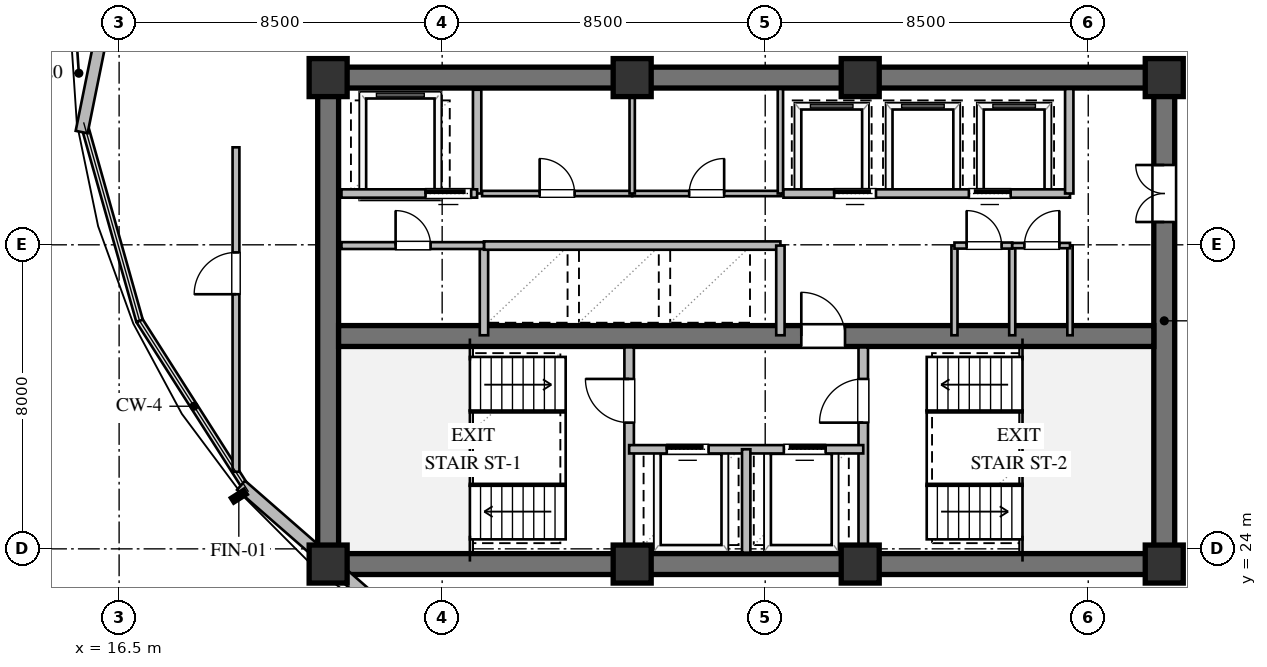
"""IFC4 building model, lengths in metres.
Left out: names, types, materials, properties, quantities, classifications, styles, units other than length and angle.
Written with IfcOpenShell. Run it as: python <this file> out.ifc"""

import sys

from ifc_helpers import new_model, si_unit, direction, frame, frame_2d, origin, origin_2d, place, context, subcontext, project, spatial, rectangle, extrude, element, fill, save


model = new_model("IFC4")
c1 = context("Model", 3, precision=1e-05, world=origin(), true_north=direction((0.0, 1.0)))
c2 = subcontext(c1, "Body", "Model", "MODEL_VIEW")
j1 = project(units=[si_unit("LENGTHUNIT", "METRE"), si_unit("PLANEANGLEUNIT", "RADIAN")], contexts=[c1])
p1 = place(None, origin())
s1 = spatial("IfcSite", under=j1, at=p1, CompositionType="ELEMENT")
p2 = place(p1, origin())
s2 = spatial("IfcBuilding", under=s1, at=p2, CompositionType="ELEMENT")
p3 = place(p2, frame((0.0, 0.0, 138.6)))
s3 = spatial("IfcBuildingStorey", under=s2, at=p3, CompositionType="ELEMENT", Elevation=138.6)
for number, where, z_axis, x_axis in (
    (1, (21.725, 23.6, 0.0), (0.0, 0.0, 1.0), (1.0, 0.0, 0.0)),
    (2, (21.725, 36.4, 0.0), (0.0, 0.0, 1.0), (1.0, 0.0, 0.0)),
):
    element("IfcWall", number, at=place(p3, frame(where, z_axis=z_axis, x_axis=x_axis)), inside=s3, PredefinedType="SHEAR", context=c2, shape_type="SweptSolid", body=[
        extrude(rectangle(XDim=22.55, YDim=0.55, at=frame_2d((11.275, 0.0))), origin(), (0.0, 0.0, 1.0), 3.36),
    ])
p4 = place(p3, frame((22.0, 23.875, 0.0), z_axis=(0.0, 0.0, 1.0), x_axis=(0.0, 1.0, 0.0)))
e3 = element("IfcWall", 3, at=p4, inside=s3, PredefinedType="SHEAR", context=c2, shape_type="SweptSolid", body=[
    extrude(rectangle(XDim=12.25, YDim=0.55, at=frame_2d((6.125, 0.0))), origin(), (0.0, 0.0, 1.0), 3.36),
])
p5 = place(p3, frame((44.0, 23.875, 0.0), z_axis=(0.0, 0.0, 1.0), x_axis=(0.0, 1.0, 0.0)))
e4 = element("IfcWall", 4, at=p5, inside=s3, PredefinedType="SHEAR", context=c2, shape_type="SweptSolid", body=[
    extrude(rectangle(XDim=12.25, YDim=0.55, at=frame_2d((6.125, 0.0))), origin(), (0.0, 0.0, 1.0), 3.36),
])
p6 = place(p5, frame((8.725, 0.0, 0.0)))
e5 = element("IfcOpeningElement", 5, at=p6, cuts=e4, PredefinedType="OPENING", context=c2, shape_type="SweptSolid", body=[
    extrude(rectangle(XDim=1.5, YDim=2.15, at=frame_2d((0.75, 1.075))), frame((0.0, 0.285, 0.0), z_axis=(0.0, -1.0, 0.0), x_axis=(1.0, 0.0, 0.0)), (0.0, 0.0, 1.0), 0.57),
])
p7 = place(p3, frame((22.275, 29.6, 0.0), z_axis=(0.0, 0.0, 1.0), x_axis=(1.0, 0.0, 0.0)))
e6 = element("IfcWall", 6, at=p7, inside=s3, PredefinedType="SHEAR", context=c2, shape_type="SweptSolid", body=[
    extrude(rectangle(XDim=21.45, YDim=0.55, at=frame_2d((10.725, 0.0))), origin(), (0.0, 0.0, 1.0), 3.36),
])
p8 = place(p7, frame((12.175, 0.0, 0.0)))
e7 = element("IfcOpeningElement", 7, at=p8, cuts=e6, PredefinedType="OPENING", context=c2, shape_type="SweptSolid", body=[
    extrude(rectangle(XDim=1.15, YDim=2.1, at=frame_2d((0.575, 1.05))), frame((0.0, 0.285, 0.0), z_axis=(0.0, -1.0, 0.0), x_axis=(1.0, 0.0, 0.0)), (0.0, 0.0, 1.0), 0.57),
])
for number, where, z_axis, x_axis in (
    (8, (22.0, 23.6, 0.0), (0.0, 0.0, 1.0), (1.0, 0.0, 0.0)),
    (9, (30.0, 23.6, 0.0), (0.0, 0.0, 1.0), (1.0, 0.0, 0.0)),
    (10, (36.0, 23.6, 0.0), (0.0, 0.0, 1.0), (1.0, 0.0, 0.0)),
    (11, (44.0, 23.6, 0.0), (0.0, 0.0, 1.0), (1.0, 0.0, 0.0)),
    (12, (44.0, 36.4, 0.0), (0.0, 0.0, 1.0), (1.0, 0.0, 0.0)),
    (13, (36.0, 36.4, 0.0), (0.0, 0.0, 1.0), (1.0, 0.0, 0.0)),
    (14, (30.0, 36.4, 0.0), (0.0, 0.0, 1.0), (1.0, 0.0, 0.0)),
    (15, (22.0, 36.4, 0.0), (0.0, 0.0, 1.0), (1.0, 0.0, 0.0)),
):
    element("IfcColumn", number, at=place(p3, frame(where, z_axis=z_axis, x_axis=x_axis)), inside=s3, PredefinedType="COLUMN", context=c2, shape_type="SweptSolid", body=[
        extrude(rectangle(XDim=1.0, YDim=1.0, at=origin_2d()), origin(), (0.0, 0.0, 1.0), 3.6),
    ])
p9 = place(p3, frame((24.225, 21.727, 0.0), z_axis=(0.0, 0.0, 1.0), x_axis=(-0.753105964003, 0.657899237713, 0.0)))
e16 = element("IfcWall", 16, at=p9, inside=s3, PredefinedType="STANDARD", context=c2, shape_type="SweptSolid", body=[
    extrude(rectangle(XDim=5.998, YDim=0.32, at=frame_2d((2.999, 0.0))), origin(), (0.0, 0.0, 1.0), 2.35),
])
p10 = place(p3, frame((15.514, 34.967, 0.0), z_axis=(0.0, 0.0, 1.0), x_axis=(0.198370893133, 0.980127026848, 0.0)))
e17 = element("IfcWall", 17, at=p10, inside=s3, PredefinedType="STANDARD", context=c2, shape_type="SweptSolid", body=[
    extrude(rectangle(XDim=14.469, YDim=0.32, at=frame_2d((7.234, 0.0))), origin(), (0.0, 0.0, 1.0), 3.36),
])
p11 = place(p3, frame((29.92, 23.9, 0.0), z_axis=(0.0, 0.0, 1.0), x_axis=(0.0, 1.0, 0.0)))
e18 = element("IfcWall", 18, at=p11, inside=s3, PredefinedType="SOLIDWALL", context=c2, shape_type="SweptSolid", body=[
    extrude(rectangle(XDim=5.4, YDim=0.25, at=frame_2d((2.7, 0.0))), origin(), (0.0, 0.0, 1.0), 2.806),
])
p12 = place(p11, frame((3.421, 0.0, 0.0)))
e19 = element("IfcOpeningElement", 19, at=p12, cuts=e18, PredefinedType="OPENING", context=c2, shape_type="SweptSolid", body=[
    extrude(rectangle(XDim=1.15, YDim=2.1, at=frame_2d((0.575, 1.05))), frame((0.0, 0.135, 0.0), z_axis=(0.0, -1.0, 0.0), x_axis=(1.0, 0.0, 0.0)), (0.0, 0.0, 1.0), 0.27),
])
p13 = place(p3, frame((36.08, 23.9, 0.0), z_axis=(0.0, 0.0, 1.0), x_axis=(0.0, 1.0, 0.0)))
e20 = element("IfcWall", 20, at=p13, inside=s3, PredefinedType="SOLIDWALL", context=c2, shape_type="SweptSolid", body=[
    extrude(rectangle(XDim=5.4, YDim=0.25, at=frame_2d((2.7, 0.0))), origin(), (0.0, 0.0, 1.0), 3.36),
])
p14 = place(p13, frame((3.421, 0.0, 0.0)))
e21 = element("IfcOpeningElement", 21, at=p14, cuts=e20, PredefinedType="OPENING", context=c2, shape_type="SweptSolid", body=[
    extrude(rectangle(XDim=1.15, YDim=2.1, at=frame_2d((0.575, 1.05))), frame((0.0, 0.135, 0.0), z_axis=(0.0, -1.0, 0.0), x_axis=(1.0, 0.0, 0.0)), (0.0, 0.0, 1.0), 0.27),
])
p15 = place(p3, frame((29.92, 26.62, 0.0), z_axis=(0.0, 0.0, 1.0), x_axis=(1.0, 0.0, 0.0)))
e22 = element("IfcWall", 22, at=p15, inside=s3, PredefinedType="SOLIDWALL", context=c2, shape_type="SweptSolid", body=[
    extrude(rectangle(XDim=6.16, YDim=0.22, at=frame_2d((3.08, 0.0))), origin(), (0.0, 0.0, 1.0), 3.36),
])
p16 = place(p15, frame((0.99, 0.0, 0.0)))
e23 = element("IfcOpeningElement", 23, at=p16, cuts=e22, PredefinedType="OPENING", context=c2, shape_type="SweptSolid", body=[
    extrude(rectangle(XDim=1.1, YDim=2.1, at=frame_2d((0.55, 1.05))), frame((0.0, 0.12, 0.0), z_axis=(0.0, -1.0, 0.0), x_axis=(1.0, 0.0, 0.0)), (0.0, 0.0, 1.0), 0.24),
])
p17 = place(p15, frame((4.07, 0.0, 0.0)))
e24 = element("IfcOpeningElement", 24, at=p17, cuts=e22, PredefinedType="OPENING", context=c2, shape_type="SweptSolid", body=[
    extrude(rectangle(XDim=1.1, YDim=2.1, at=frame_2d((0.55, 1.05))), frame((0.0, 0.12, 0.0), z_axis=(0.0, -1.0, 0.0), x_axis=(1.0, 0.0, 0.0)), (0.0, 0.0, 1.0), 0.24),
])
p18 = place(p3, frame((33.0, 23.9, 0.0), z_axis=(0.0, 0.0, 1.0), x_axis=(0.0, 1.0, 0.0)))
e25 = element("IfcWall", 25, at=p18, inside=s3, PredefinedType="SOLIDWALL", context=c2, shape_type="SweptSolid", body=[
    extrude(rectangle(XDim=2.72, YDim=0.22, at=frame_2d((1.36, 0.0))), origin(), (0.0, 0.0, 1.0), 3.36),
])
p19 = place(p3, frame((25.92, 33.35, 0.0), z_axis=(0.0, 0.0, 1.0), x_axis=(0.0, 1.0, 0.0)))
e26 = element("IfcWall", 26, at=p19, inside=s3, PredefinedType="SOLIDWALL", context=c2, shape_type="SweptSolid", body=[
    extrude(rectangle(XDim=2.73, YDim=0.22, at=frame_2d((1.365, 0.0))), origin(), (0.0, 0.0, 1.0), 3.36),
])
p20 = place(p3, frame((22.35, 33.35, 0.0), z_axis=(0.0, 0.0, 1.0), x_axis=(1.0, 0.0, 0.0)))
e27 = element("IfcWall", 27, at=p20, inside=s3, PredefinedType="SOLIDWALL", context=c2, shape_type="SweptSolid", body=[
    extrude(rectangle(XDim=3.57, YDim=0.22, at=frame_2d((1.785, 0.0))), origin(), (0.0, 0.0, 1.0), 3.36),
])
p21 = place(p20, frame((2.213, 0.0, 0.0)))
e28 = element("IfcOpeningElement", 28, at=p21, cuts=e27, PredefinedType="OPENING", context=c2, shape_type="SweptSolid", body=[
    extrude(rectangle(XDim=1.2, YDim=2.1, at=frame_2d((0.6, 1.05))), frame((0.0, 0.12, 0.0), z_axis=(0.0, -1.0, 0.0), x_axis=(1.0, 0.0, 0.0)), (0.0, 0.0, 1.0), 0.24),
])
p22 = place(p3, frame((26.1, 29.62, 0.0), z_axis=(0.0, 0.0, 1.0), x_axis=(0.0, 1.0, 0.0)))
e29 = element("IfcWall", 29, at=p22, inside=s3, PredefinedType="SOLIDWALL", context=c2, shape_type="SweptSolid", body=[
    extrude(rectangle(XDim=2.36, YDim=0.22, at=frame_2d((1.18, 0.0))), origin(), (0.0, 0.0, 1.0), 3.36),
])
p23 = place(p3, frame((26.1, 31.98, 0.0), z_axis=(0.0, 0.0, 1.0), x_axis=(1.0, 0.0, 0.0)))
e30 = element("IfcWall", 30, at=p23, inside=s3, PredefinedType="SOLIDWALL", context=c2, shape_type="SweptSolid", body=[
    extrude(rectangle(XDim=7.8, YDim=0.22, at=frame_2d((3.9, 0.0))), origin(), (0.0, 0.0, 1.0), 3.36),
])
p24 = place(p3, frame((33.9, 29.62, 0.0), z_axis=(0.0, 0.0, 1.0), x_axis=(0.0, 1.0, 0.0)))
e31 = element("IfcWall", 31, at=p24, inside=s3, PredefinedType="SOLIDWALL", context=c2, shape_type="SweptSolid", body=[
    extrude(rectangle(XDim=2.36, YDim=0.22, at=frame_2d((1.18, 0.0))), origin(), (0.0, 0.0, 1.0), 3.36),
])
p25 = place(p3, frame((26.05, 33.35, 0.0), z_axis=(0.0, 0.0, 1.0), x_axis=(1.0, 0.0, 0.0)))
e32 = element("IfcWall", 32, at=p25, inside=s3, PredefinedType="PARTITIONING", context=c2, shape_type="SweptSolid", body=[
    extrude(rectangle(XDim=3.95, YDim=0.14, at=frame_2d((1.975, 0.0))), origin(), (0.0, 0.0, 1.0), 3.36),
])
p26 = place(p25, frame((1.515, 0.0, 0.0)))
e33 = element("IfcOpeningElement", 33, at=p26, cuts=e32, PredefinedType="OPENING", context=c2, shape_type="SweptSolid", body=[
    extrude(rectangle(XDim=0.92, YDim=2.1, at=frame_2d((0.46, 1.05))), frame((0.0, 0.08, 0.0), z_axis=(0.0, -1.0, 0.0), x_axis=(1.0, 0.0, 0.0)), (0.0, 0.0, 1.0), 0.16),
])
p27 = place(p3, frame((30.0, 33.35, 0.0), z_axis=(0.0, 0.0, 1.0), x_axis=(1.0, 0.0, 0.0)))
e34 = element("IfcWall", 34, at=p27, inside=s3, PredefinedType="PARTITIONING", context=c2, shape_type="SweptSolid", body=[
    extrude(rectangle(XDim=3.92, YDim=0.14, at=frame_2d((1.96, 0.0))), origin(), (0.0, 0.0, 1.0), 3.36),
])
p28 = place(p27, frame((1.5, 0.0, 0.0)))
e35 = element("IfcOpeningElement", 35, at=p28, cuts=e34, PredefinedType="OPENING", context=c2, shape_type="SweptSolid", body=[
    extrude(rectangle(XDim=0.92, YDim=2.1, at=frame_2d((0.46, 1.05))), frame((0.0, 0.08, 0.0), z_axis=(0.0, -1.0, 0.0), x_axis=(1.0, 0.0, 0.0)), (0.0, 0.0, 1.0), 0.16),
])
for number, where, z_axis, x_axis in (
    (36, (30.0, 33.35, 0.0), (0.0, 0.0, 1.0), (0.0, 1.0, 0.0)),
    (37, (33.9, 33.35, 0.0), (0.0, 0.0, 1.0), (0.0, 1.0, 0.0)),
):
    element("IfcWall", number, at=place(p3, frame(where, z_axis=z_axis, x_axis=x_axis)), inside=s3, PredefinedType="PARTITIONING", context=c2, shape_type="SweptSolid", body=[
        extrude(rectangle(XDim=2.75, YDim=0.14, at=frame_2d((1.375, 0.0))), origin(), (0.0, 0.0, 1.0), 3.36),
    ])
p29 = place(p3, frame((33.98, 33.35, 0.0), z_axis=(0.0, 0.0, 1.0), x_axis=(1.0, 0.0, 0.0)))
e38 = element("IfcWall", 38, at=p29, inside=s3, PredefinedType="SOLIDWALL", context=c2, shape_type="SweptSolid", body=[
    extrude(rectangle(XDim=7.54, YDim=0.22, at=frame_2d((3.77, 0.0))), origin(), (0.0, 0.0, 1.0), 3.36),
])
p30 = place(p29, frame((1.335, 0.0, 0.0)))
e39 = element("IfcOpeningElement", 39, at=p30, cuts=e38, PredefinedType="OPENING", context=c2, shape_type="SweptSolid", body=[
    extrude(rectangle(XDim=1.1, YDim=2.1, at=frame_2d((0.55, 1.05))), frame((0.0, 0.12, 0.0), z_axis=(0.0, -1.0, 0.0), x_axis=(1.0, 0.0, 0.0)), (0.0, 0.0, 1.0), 0.24),
])
p31 = place(p29, frame((4.879, 0.0, 0.0)))
e40 = element("IfcOpeningElement", 40, at=p31, cuts=e38, PredefinedType="OPENING", context=c2, shape_type="SweptSolid", body=[
    extrude(rectangle(XDim=1.1, YDim=2.1, at=frame_2d((0.55, 1.05))), frame((0.0, 0.12, 0.0), z_axis=(0.0, -1.0, 0.0), x_axis=(1.0, 0.0, 0.0)), (0.0, 0.0, 1.0), 0.24),
])
p32 = place(p3, frame((41.5, 33.35, 0.0), z_axis=(0.0, 0.0, 1.0), x_axis=(0.0, 1.0, 0.0)))
e41 = element("IfcWall", 41, at=p32, inside=s3, PredefinedType="SOLIDWALL", context=c2, shape_type="SweptSolid", body=[
    extrude(rectangle(XDim=2.75, YDim=0.22, at=frame_2d((1.375, 0.0))), origin(), (0.0, 0.0, 1.0), 3.36),
])
p33 = place(p3, frame((22.35, 31.98, 0.0), z_axis=(0.0, 0.0, 1.0), x_axis=(1.0, 0.0, 0.0)))
e42 = element("IfcWall", 42, at=p33, inside=s3, PredefinedType="PARTITIONING", context=c2, shape_type="SweptSolid", body=[
    extrude(rectangle(XDim=3.75, YDim=0.18, at=frame_2d((1.875, 0.0))), origin(), (0.0, 0.0, 1.0), 3.36),
])
p34 = place(p33, frame((1.425, 0.0, 0.0)))
e43 = element("IfcOpeningElement", 43, at=p34, cuts=e42, PredefinedType="OPENING", context=c2, shape_type="SweptSolid", body=[
    extrude(rectangle(XDim=0.92, YDim=2.1, at=frame_2d((0.46, 1.05))), frame((0.0, 0.1, 0.0), z_axis=(0.0, -1.0, 0.0), x_axis=(1.0, 0.0, 0.0)), (0.0, 0.0, 1.0), 0.2),
])
for number, where, z_axis, x_axis in (
    (44, (38.48, 29.62, 0.0), (0.0, 0.0, 1.0), (0.0, 1.0, 0.0)),
    (45, (40.0, 29.62, 0.0), (0.0, 0.0, 1.0), (0.0, 1.0, 0.0)),
):
    element("IfcWall", number, at=place(p3, frame(where, z_axis=z_axis, x_axis=x_axis)), inside=s3, PredefinedType="PLUMBINGWALL", context=c2, shape_type="SweptSolid", body=[
        extrude(rectangle(XDim=2.36, YDim=0.16, at=frame_2d((1.18, 0.0))), origin(), (0.0, 0.0, 1.0), 3.36),
    ])
p35 = place(p3, frame((41.52, 29.62, 0.0), z_axis=(0.0, 0.0, 1.0), x_axis=(0.0, 1.0, 0.0)))
e46 = element("IfcWall", 46, at=p35, inside=s3, PredefinedType="PARTITIONING", context=c2, shape_type="SweptSolid", body=[
    extrude(rectangle(XDim=2.36, YDim=0.14, at=frame_2d((1.18, 0.0))), origin(), (0.0, 0.0, 1.0), 3.36),
])
p36 = place(p3, frame((38.48, 31.98, 0.0), z_axis=(0.0, 0.0, 1.0), x_axis=(1.0, 0.0, 0.0)))
e47 = element("IfcWall", 47, at=p36, inside=s3, PredefinedType="PLUMBINGWALL", context=c2, shape_type="SweptSolid", body=[
    extrude(rectangle(XDim=1.52, YDim=0.16, at=frame_2d((0.76, 0.0))), origin(), (0.0, 0.0, 1.0), 3.36),
])
p37 = place(p36, frame((0.32, 0.0, 0.0)))
e48 = element("IfcOpeningElement", 48, at=p37, cuts=e47, PredefinedType="OPENING", context=c2, shape_type="SweptSolid", body=[
    extrude(rectangle(XDim=0.92, YDim=2.1, at=frame_2d((0.46, 1.05))), frame((0.0, 0.09, 0.0), z_axis=(0.0, -1.0, 0.0), x_axis=(1.0, 0.0, 0.0)), (0.0, 0.0, 1.0), 0.18),
])
p38 = place(p3, frame((40.0, 31.98, 0.0), z_axis=(0.0, 0.0, 1.0), x_axis=(1.0, 0.0, 0.0)))
e49 = element("IfcWall", 49, at=p38, inside=s3, PredefinedType="PARTITIONING", context=c2, shape_type="SweptSolid", body=[
    extrude(rectangle(XDim=1.52, YDim=0.14, at=frame_2d((0.76, 0.0))), origin(), (0.0, 0.0, 1.0), 3.36),
])
p39 = place(p38, frame((0.32, 0.0, 0.0)))
e50 = element("IfcOpeningElement", 50, at=p39, cuts=e49, PredefinedType="OPENING", context=c2, shape_type="SweptSolid", body=[
    extrude(rectangle(XDim=0.92, YDim=2.1, at=frame_2d((0.46, 1.05))), frame((0.0, 0.08, 0.0), z_axis=(0.0, -1.0, 0.0), x_axis=(1.0, 0.0, 0.0)), (0.0, 0.0, 1.0), 0.16),
])
p40 = place(p3, frame((19.575, 26.029, 0.0), z_axis=(0.0, 0.0, 1.0), x_axis=(0.0, 1.0, 0.0)))
e51 = element("IfcWall", 51, at=p40, inside=s3, PredefinedType="PARTITIONING", context=c2, shape_type="SweptSolid", body=[
    extrude(rectangle(XDim=8.536, YDim=0.18, at=frame_2d((4.268, 0.0))), origin(), (0.0, 0.0, 1.0), 2.657),
])
p41 = place(p40, frame((4.671, 0.0, 0.0)))
e52 = element("IfcOpeningElement", 52, at=p41, cuts=e51, PredefinedType="OPENING", context=c2, shape_type="SweptSolid", body=[
    extrude(rectangle(XDim=1.1, YDim=2.1, at=frame_2d((0.55, 1.05))), frame((0.0, 0.1, 0.0), z_axis=(0.0, -1.0, 0.0), x_axis=(1.0, 0.0, 0.0)), (0.0, 0.0, 1.0), 0.2),
])
p42 = place(p12, origin())
e53 = element("IfcDoor", 53, at=p42, inside=s3, OperationType="SINGLE_SWING_RIGHT", PredefinedType="DOOR", context=c2, shape_type="SweptSolid", body=[
    extrude(rectangle(XDim=1.15, YDim=2.1, at=frame_2d((0.575, 1.05))), frame((0.0, 0.025, 0.0), z_axis=(0.0, -1.0, 0.0), x_axis=(1.0, 0.0, 0.0)), (0.0, 0.0, 1.0), 0.05),
])
fill(e19, e53)
p43 = place(p14, origin())
e54 = element("IfcDoor", 54, at=p43, inside=s3, OperationType="SINGLE_SWING_LEFT", PredefinedType="DOOR", context=c2, shape_type="SweptSolid", body=[
    extrude(rectangle(XDim=1.15, YDim=2.1, at=frame_2d((0.575, 1.05))), frame((0.0, 0.025, 0.0), z_axis=(0.0, -1.0, 0.0), x_axis=(1.0, 0.0, 0.0)), (0.0, 0.0, 1.0), 0.05),
])
fill(e21, e54)
p44 = place(p16, origin())
e55 = element("IfcDoor", 55, at=p44, inside=s3, OperationType="SLIDING_TO_LEFT", PredefinedType="DOOR", context=c2, shape_type="SweptSolid", body=[
    extrude(rectangle(XDim=1.1, YDim=2.1, at=frame_2d((0.55, 1.05))), frame((0.0, 0.025, 0.0), z_axis=(0.0, -1.0, 0.0), x_axis=(1.0, 0.0, 0.0)), (0.0, 0.0, 1.0), 0.05),
])
fill(e23, e55)
p45 = place(p17, origin())
e56 = element("IfcDoor", 56, at=p45, inside=s3, OperationType="SLIDING_TO_RIGHT", PredefinedType="DOOR", context=c2, shape_type="SweptSolid", body=[
    extrude(rectangle(XDim=1.1, YDim=2.1, at=frame_2d((0.55, 1.05))), frame((0.0, 0.025, 0.0), z_axis=(0.0, -1.0, 0.0), x_axis=(1.0, 0.0, 0.0)), (0.0, 0.0, 1.0), 0.05),
])
fill(e24, e56)
p46 = place(p8, origin())
e57 = element("IfcDoor", 57, at=p46, inside=s3, OperationType="SINGLE_SWING_LEFT", PredefinedType="DOOR", context=c2, shape_type="SweptSolid", body=[
    extrude(rectangle(XDim=1.15, YDim=2.1, at=frame_2d((0.575, 1.05))), frame((0.0, 0.025, 0.0), z_axis=(0.0, -1.0, 0.0), x_axis=(1.0, 0.0, 0.0)), (0.0, 0.0, 1.0), 0.05),
])
fill(e7, e57)
p47 = place(p6, origin())
e58 = element("IfcDoor", 58, at=p47, inside=s3, OperationType="DOUBLE_DOOR_SINGLE_SWING", PredefinedType="DOOR", context=c2, shape_type="SweptSolid", body=[
    extrude(rectangle(XDim=1.5, YDim=2.15, at=frame_2d((0.75, 1.075))), frame((0.0, 0.025, 0.0), z_axis=(0.0, -1.0, 0.0), x_axis=(1.0, 0.0, 0.0)), (0.0, 0.0, 1.0), 0.05),
])
fill(e5, e58)
p48 = place(p21, origin())
e59 = element("IfcDoor", 59, at=p48, inside=s3, OperationType="SLIDING_TO_LEFT", PredefinedType="DOOR", context=c2, shape_type="SweptSolid", body=[
    extrude(rectangle(XDim=1.2, YDim=2.1, at=frame_2d((0.6, 1.05))), frame((0.0, 0.025, 0.0), z_axis=(0.0, -1.0, 0.0), x_axis=(1.0, 0.0, 0.0)), (0.0, 0.0, 1.0), 0.05),
])
fill(e28, e59)
p49 = place(p26, origin())
e60 = element("IfcDoor", 60, at=p49, inside=s3, OperationType="SINGLE_SWING_LEFT", PredefinedType="DOOR", context=c2, shape_type="SweptSolid", body=[
    extrude(rectangle(XDim=0.92, YDim=2.1, at=frame_2d((0.46, 1.05))), frame((0.0, 0.025, 0.0), z_axis=(0.0, -1.0, 0.0), x_axis=(1.0, 0.0, 0.0)), (0.0, 0.0, 1.0), 0.05),
])
fill(e33, e60)
p50 = place(p28, origin())
e61 = element("IfcDoor", 61, at=p50, inside=s3, OperationType="SINGLE_SWING_RIGHT", PredefinedType="DOOR", context=c2, shape_type="SweptSolid", body=[
    extrude(rectangle(XDim=0.92, YDim=2.1, at=frame_2d((0.46, 1.05))), frame((0.0, 0.025, 0.0), z_axis=(0.0, -1.0, 0.0), x_axis=(1.0, 0.0, 0.0)), (0.0, 0.0, 1.0), 0.05),
])
fill(e35, e61)
p51 = place(p30, origin())
e62 = element("IfcDoor", 62, at=p51, inside=s3, OperationType="SLIDING_TO_LEFT", PredefinedType="DOOR", context=c2, shape_type="SweptSolid", body=[
    extrude(rectangle(XDim=1.1, YDim=2.1, at=frame_2d((0.55, 1.05))), frame((0.0, 0.025, 0.0), z_axis=(0.0, -1.0, 0.0), x_axis=(1.0, 0.0, 0.0)), (0.0, 0.0, 1.0), 0.05),
])
fill(e39, e62)
p52 = place(p31, origin())
e63 = element("IfcDoor", 63, at=p52, inside=s3, OperationType="SLIDING_TO_RIGHT", PredefinedType="DOOR", context=c2, shape_type="SweptSolid", body=[
    extrude(rectangle(XDim=1.1, YDim=2.1, at=frame_2d((0.55, 1.05))), frame((0.0, 0.025, 0.0), z_axis=(0.0, -1.0, 0.0), x_axis=(1.0, 0.0, 0.0)), (0.0, 0.0, 1.0), 0.05),
])
fill(e40, e63)
p53 = place(p34, origin())
e64 = element("IfcDoor", 64, at=p53, inside=s3, OperationType="SINGLE_SWING_LEFT", PredefinedType="DOOR", context=c2, shape_type="SweptSolid", body=[
    extrude(rectangle(XDim=0.92, YDim=2.1, at=frame_2d((0.46, 1.05))), frame((0.0, 0.025, 0.0), z_axis=(0.0, -1.0, 0.0), x_axis=(1.0, 0.0, 0.0)), (0.0, 0.0, 1.0), 0.05),
])
fill(e43, e64)
p54 = place(p37, origin())
e65 = element("IfcDoor", 65, at=p54, inside=s3, OperationType="SINGLE_SWING_LEFT", PredefinedType="DOOR", context=c2, shape_type="SweptSolid", body=[
    extrude(rectangle(XDim=0.92, YDim=2.1, at=frame_2d((0.46, 1.05))), frame((0.0, 0.025, 0.0), z_axis=(0.0, -1.0, 0.0), x_axis=(1.0, 0.0, 0.0)), (0.0, 0.0, 1.0), 0.05),
])
fill(e48, e65)
p55 = place(p39, origin())
e66 = element("IfcDoor", 66, at=p55, inside=s3, OperationType="SINGLE_SWING_RIGHT", PredefinedType="DOOR", context=c2, shape_type="SweptSolid", body=[
    extrude(rectangle(XDim=0.92, YDim=2.1, at=frame_2d((0.46, 1.05))), frame((0.0, 0.025, 0.0), z_axis=(0.0, -1.0, 0.0), x_axis=(1.0, 0.0, 0.0)), (0.0, 0.0, 1.0), 0.05),
])
fill(e50, e66)
p56 = place(p41, origin())
e67 = element("IfcDoor", 67, at=p56, inside=s3, OperationType="SINGLE_SWING_LEFT", PredefinedType="DOOR", context=c2, shape_type="SweptSolid", body=[
    extrude(rectangle(XDim=1.1, YDim=2.1, at=frame_2d((0.55, 1.05))), frame((0.0, 0.025, 0.0), z_axis=(0.0, -1.0, 0.0), x_axis=(1.0, 0.0, 0.0)), (0.0, 0.0, 1.0), 0.05),
])
fill(e52, e67)
save(model, sys.argv[1])
